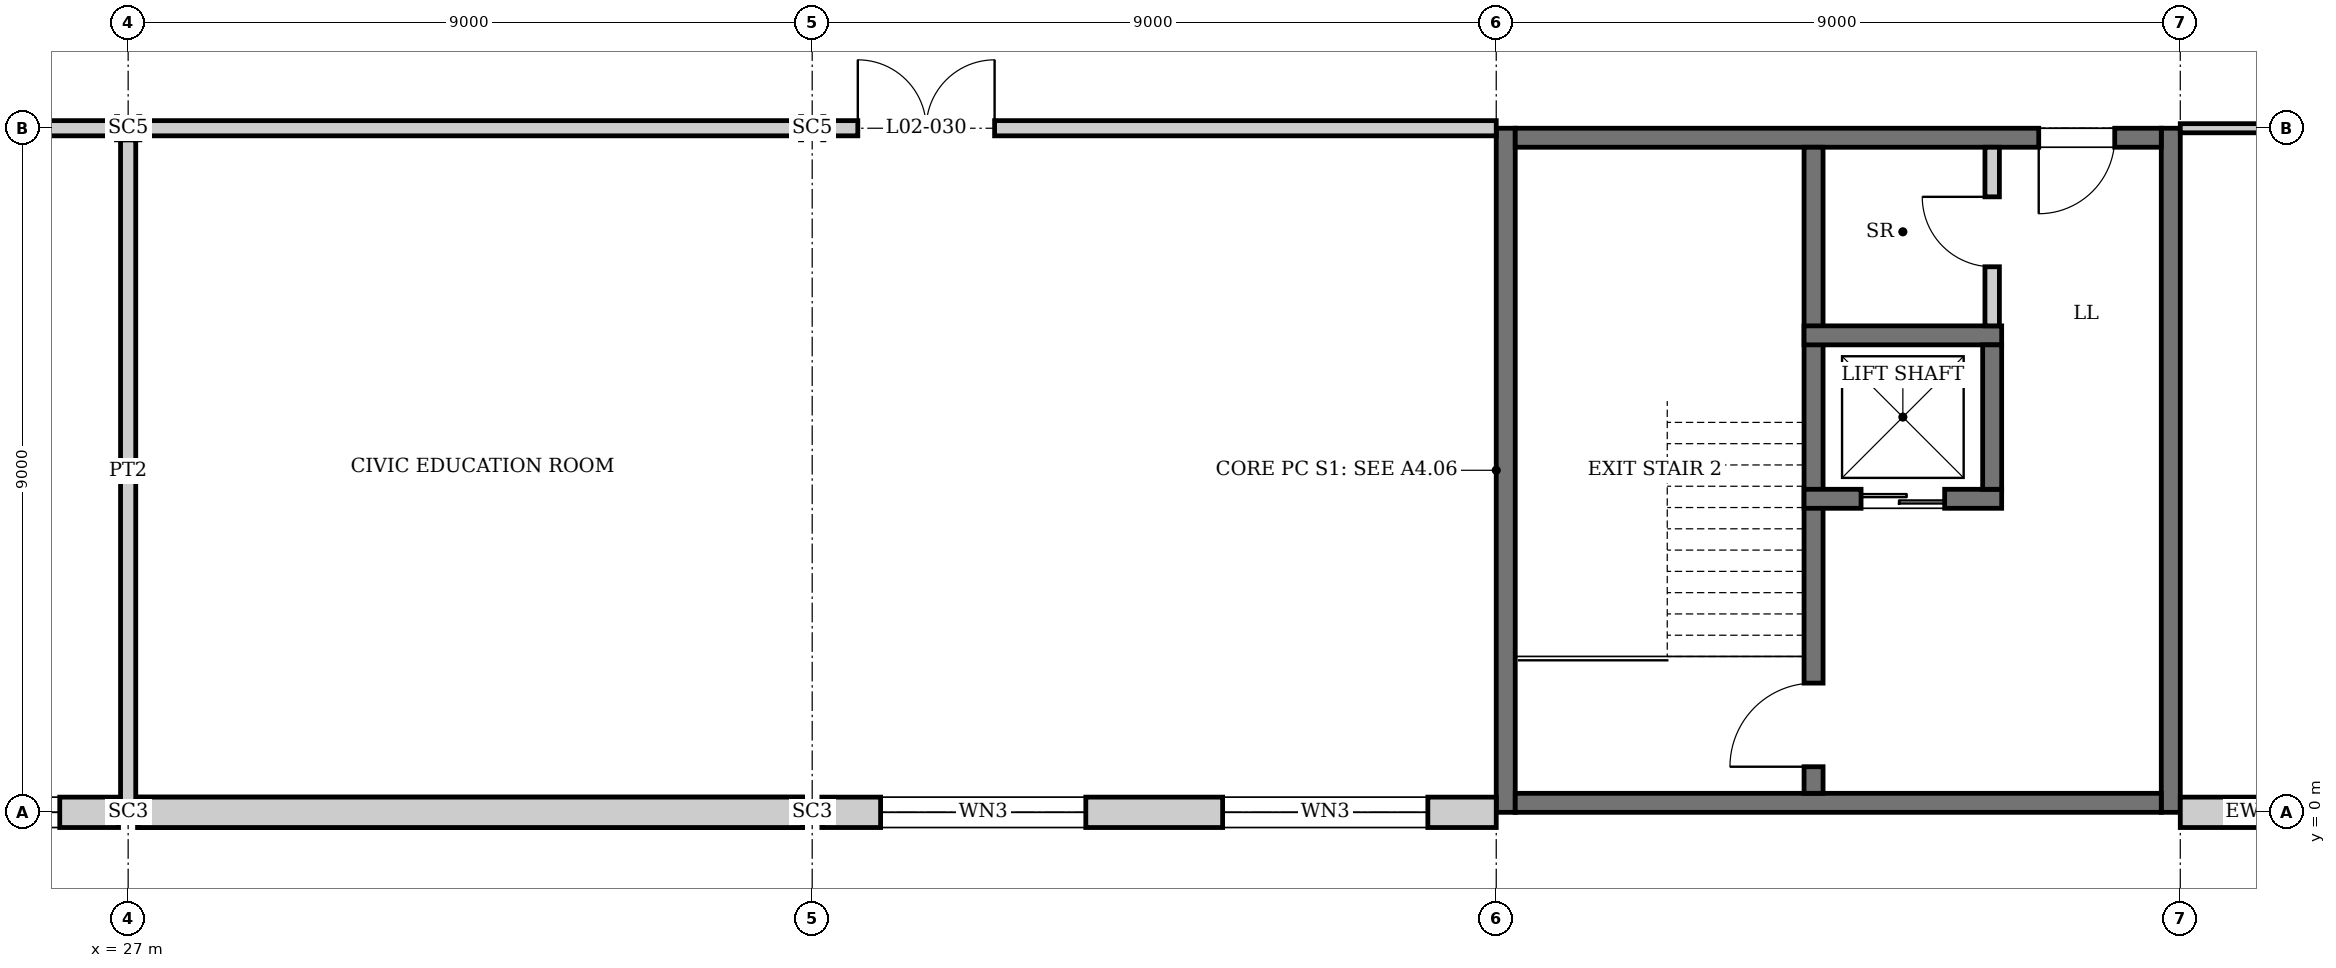
"""IFC4 building model, lengths in metres.
Left out: names, types, materials, properties, quantities, classifications, styles, units other than length and angle.
Written with IfcOpenShell. Run it as: python <this file> out.ifc"""

import sys

from ifc_helpers import new_model, si_unit, direction, frame, frame_2d, origin, origin_2d, place, context, subcontext, project, spatial, polyline, rectangle, i_section, outline, extrude, element, fill, save


model = new_model("IFC4")
c1 = context("Model", 3, precision=1e-05, world=origin(), true_north=direction((0.0, 1.0)))
c2 = subcontext(c1, "Body", "Model", "MODEL_VIEW")
j1 = project(units=[si_unit("LENGTHUNIT", "METRE"), si_unit("PLANEANGLEUNIT", "RADIAN")], contexts=[c1])
p1 = place(None, origin())
s1 = spatial("IfcSite", under=j1, at=p1, CompositionType="ELEMENT")
p2 = place(p1, origin())
s2 = spatial("IfcBuilding", under=s1, at=p2, CompositionType="ELEMENT")
p3 = place(p2, frame((0.0, 0.0, 10.5)))
s3 = spatial("IfcBuildingStorey", under=s2, at=p3, CompositionType="ELEMENT", Elevation=10.5)
p4 = place(p3, frame((27.0, 0.0, 0.0), z_axis=(0.0, 0.0, 1.0), x_axis=(0.0, 1.0, 0.0)))
e1 = element("IfcColumn", 1, at=p4, inside=s3, PredefinedType="COLUMN", context=c2, shape_type="SweptSolid", body=[
    extrude(i_section(OverallWidth=0.254, OverallDepth=0.254, WebThickness=0.009, FlangeThickness=0.014, at=origin_2d()), origin(), (0.0, 0.0, 1.0), 4.5),
])
p5 = place(p3, frame((27.0, 9.0, 0.0), z_axis=(0.0, 0.0, 1.0), x_axis=(0.0, 1.0, 0.0)))
e2 = element("IfcColumn", 2, at=p5, inside=s3, PredefinedType="COLUMN", context=c2, shape_type="SweptSolid", body=[
    extrude(i_section(OverallWidth=0.305, OverallDepth=0.308, WebThickness=0.01, FlangeThickness=0.015, at=origin_2d()), origin(), (0.0, 0.0, 1.0), 4.5),
])
p6 = place(p3, frame((36.0, 0.0, 0.0), z_axis=(0.0, 0.0, 1.0), x_axis=(0.0, 1.0, 0.0)))
e3 = element("IfcColumn", 3, at=p6, inside=s3, PredefinedType="COLUMN", context=c2, shape_type="SweptSolid", body=[
    extrude(i_section(OverallWidth=0.254, OverallDepth=0.254, WebThickness=0.009, FlangeThickness=0.014, at=origin_2d()), origin(), (0.0, 0.0, 1.0), 4.5),
])
p7 = place(p3, frame((36.0, 9.0, 0.0), z_axis=(0.0, 0.0, 1.0), x_axis=(0.0, 1.0, 0.0)))
e4 = element("IfcColumn", 4, at=p7, inside=s3, PredefinedType="COLUMN", context=c2, shape_type="SweptSolid", body=[
    extrude(i_section(OverallWidth=0.305, OverallDepth=0.308, WebThickness=0.01, FlangeThickness=0.015, at=origin_2d()), origin(), (0.0, 0.0, 1.0), 4.5),
])
for number, where, z_axis, x_axis in (
    (5, (45.125, 0.0, 0.0), (0.0, 0.0, 1.0), (0.0, 1.0, 0.0)),
    (6, (53.875, 0.0, 0.0), (0.0, 0.0, 1.0), (0.0, 1.0, 0.0)),
):
    element("IfcWall", number, at=place(p3, frame(where, z_axis=z_axis, x_axis=x_axis)), inside=s3, PredefinedType="SHEAR", context=c2, shape_type="SweptSolid", body=[
        extrude(rectangle(XDim=9.0, YDim=0.25, at=frame_2d((4.5, 0.0))), origin(), (0.0, 0.0, 1.0), 4.35),
    ])
p8 = place(p3, frame((45.25, 0.125, 0.0), z_axis=(0.0, 0.0, 1.0), x_axis=(1.0, 0.0, 0.0)))
e7 = element("IfcWall", 7, at=p8, inside=s3, PredefinedType="SHEAR", context=c2, shape_type="SweptSolid", body=[
    extrude(rectangle(XDim=8.5, YDim=0.25, at=frame_2d((4.25, 0.0))), origin(), (0.0, 0.0, 1.0), 4.35),
])
p9 = place(p3, frame((45.25, 8.875, 0.0), z_axis=(0.0, 0.0, 1.0), x_axis=(1.0, 0.0, 0.0)))
e8 = element("IfcWall", 8, at=p9, inside=s3, PredefinedType="SHEAR", context=c2, shape_type="SweptSolid", body=[
    extrude(rectangle(XDim=8.5, YDim=0.25, at=frame_2d((4.25, 0.0))), origin(), (0.0, 0.0, 1.0), 4.35),
])
p10 = place(p9, frame((6.887, 0.0, 0.0)))
e9 = element("IfcOpeningElement", 9, at=p10, cuts=e8, PredefinedType="OPENING", context=c2, shape_type="SweptSolid", body=[
    extrude(rectangle(XDim=1.0, YDim=2.1, at=frame_2d((0.5, 1.05))), frame((0.0, 0.135, 0.0), z_axis=(0.0, -1.0, 0.0), x_axis=(1.0, 0.0, 0.0)), (0.0, 0.0, 1.0), 0.27),
])
p11 = place(p3, frame((18.0, 0.0, 0.0), z_axis=(0.0, 0.0, 1.0), x_axis=(1.0, 0.0, 0.0)))
e10 = element("IfcWall", 10, at=p11, inside=s3, PredefinedType="SOLIDWALL", context=c2, shape_type="SweptSolid", body=[
    extrude(rectangle(XDim=8.873, YDim=0.4, at=frame_2d((4.437, 0.0))), origin(), (0.0, 0.0, 1.0), 3.991),
])
p12 = place(p11, frame((0.9, 0.0, 1.5)))
e11 = element("IfcOpeningElement", 11, at=p12, cuts=e10, PredefinedType="OPENING", context=c2, shape_type="SweptSolid", body=[
    extrude(rectangle(XDim=2.7, YDim=1.5, at=frame_2d((1.35, 0.75))), frame((0.0, 0.21, 0.0), z_axis=(0.0, -1.0, 0.0), x_axis=(1.0, 0.0, 0.0)), (0.0, 0.0, 1.0), 0.42),
])
p13 = place(p11, frame((5.4, 0.0, 1.5)))
e12 = element("IfcOpeningElement", 12, at=p13, cuts=e10, PredefinedType="OPENING", context=c2, shape_type="SweptSolid", body=[
    extrude(rectangle(XDim=2.7, YDim=1.5, at=frame_2d((1.35, 0.75))), frame((0.0, 0.21, 0.0), z_axis=(0.0, -1.0, 0.0), x_axis=(1.0, 0.0, 0.0)), (0.0, 0.0, 1.0), 0.42),
])
p14 = place(p3, frame((27.127, 0.0, 0.0), z_axis=(0.0, 0.0, 1.0), x_axis=(1.0, 0.0, 0.0)))
e13 = element("IfcWall", 13, at=p14, inside=s3, PredefinedType="SOLIDWALL", context=c2, shape_type="SweptSolid", body=[
    extrude(outline(polyline([(8.746, 0.0), (0.0, 0.0), (0.0, 0.5), (0.048, 0.38), (8.746, 3.86), (8.746, 0.0)])), frame((0.0, 0.2, 0.0), z_axis=(0.0, -1.0, 0.0), x_axis=(1.0, 0.0, 0.0)), (0.0, 0.0, 1.0), 0.4),
])
p15 = place(p3, frame((27.127, 0.0, 0.0), z_axis=(0.0, 0.0, 1.0), x_axis=(1.0, 0.0, 0.0)))
e14 = element("IfcWall", 14, at=p15, inside=s3, PredefinedType="SOLIDWALL", context=c2, shape_type="SweptSolid", body=[
    extrude(outline(polyline([(0.0, 3.991), (8.375, 3.991), (0.0, 0.64), (0.0, 3.991)])), frame((0.0, 0.2, 0.0), z_axis=(0.0, -1.0, 0.0), x_axis=(1.0, 0.0, 0.0)), (0.0, 0.0, 1.0), 0.4),
])
p16 = place(p3, frame((36.127, 0.0, 0.0), z_axis=(0.0, 0.0, 1.0), x_axis=(1.0, 0.0, 0.0)))
e15 = element("IfcWall", 15, at=p16, inside=s3, PredefinedType="SOLIDWALL", context=c2, shape_type="SweptSolid", body=[
    extrude(rectangle(XDim=8.873, YDim=0.4, at=frame_2d((4.437, 0.0))), origin(), (0.0, 0.0, 1.0), 3.991),
])
p17 = place(p16, frame((0.773, 0.0, 1.5)))
e16 = element("IfcOpeningElement", 16, at=p17, cuts=e15, PredefinedType="OPENING", context=c2, shape_type="SweptSolid", body=[
    extrude(rectangle(XDim=2.7, YDim=1.5, at=frame_2d((1.35, 0.75))), frame((0.0, 0.21, 0.0), z_axis=(0.0, -1.0, 0.0), x_axis=(1.0, 0.0, 0.0)), (0.0, 0.0, 1.0), 0.42),
])
p18 = place(p16, frame((5.273, 0.0, 1.5)))
e17 = element("IfcOpeningElement", 17, at=p18, cuts=e15, PredefinedType="OPENING", context=c2, shape_type="SweptSolid", body=[
    extrude(rectangle(XDim=2.7, YDim=1.5, at=frame_2d((1.35, 0.75))), frame((0.0, 0.21, 0.0), z_axis=(0.0, -1.0, 0.0), x_axis=(1.0, 0.0, 0.0)), (0.0, 0.0, 1.0), 0.42),
])
p19 = place(p3, frame((54.0, 0.0, 0.0), z_axis=(0.0, 0.0, 1.0), x_axis=(1.0, 0.0, 0.0)))
e18 = element("IfcWall", 18, at=p19, inside=s3, PredefinedType="SOLIDWALL", context=c2, shape_type="SweptSolid", body=[
    extrude(rectangle(XDim=8.873, YDim=0.4, at=frame_2d((4.437, 0.0))), origin(), (0.0, 0.0, 1.0), 3.991),
])
p20 = place(p19, frame((1.8, 0.0, 1.7)))
e19 = element("IfcOpeningElement", 19, at=p20, cuts=e18, PredefinedType="OPENING", context=c2, shape_type="SweptSolid", body=[
    extrude(rectangle(XDim=0.9, YDim=0.6, at=frame_2d((0.45, 0.3))), frame((0.0, 0.21, 0.0), z_axis=(0.0, -1.0, 0.0), x_axis=(1.0, 0.0, 0.0)), (0.0, 0.0, 1.0), 0.42),
])
p21 = place(p19, frame((6.3, 0.0, 1.7)))
e20 = element("IfcOpeningElement", 20, at=p21, cuts=e18, PredefinedType="OPENING", context=c2, shape_type="SweptSolid", body=[
    extrude(rectangle(XDim=0.9, YDim=0.6, at=frame_2d((0.45, 0.3))), frame((0.0, 0.21, 0.0), z_axis=(0.0, -1.0, 0.0), x_axis=(1.0, 0.0, 0.0)), (0.0, 0.0, 1.0), 0.42),
])
p22 = place(p19, frame((4.05, 0.0, 1.7)))
e21 = element("IfcOpeningElement", 21, at=p22, cuts=e18, PredefinedType="OPENING", context=c2, shape_type="SweptSolid", body=[
    extrude(rectangle(XDim=0.9, YDim=0.6, at=frame_2d((0.45, 0.3))), frame((0.0, 0.21, 0.0), z_axis=(0.0, -1.0, 0.0), x_axis=(1.0, 0.0, 0.0)), (0.0, 0.0, 1.0), 0.42),
])
p23 = place(p3, frame((49.175, 0.25, 0.0), z_axis=(0.0, 0.0, 1.0), x_axis=(0.0, 1.0, 0.0)))
e22 = element("IfcWall", 22, at=p23, inside=s3, PredefinedType="SOLIDWALL", context=c2, shape_type="SweptSolid", body=[
    extrude(rectangle(XDim=8.5, YDim=0.25, at=frame_2d((4.25, 0.0))), origin(), (0.0, 0.0, 1.0), 4.35),
])
p24 = place(p23, frame((0.35, 0.0, 0.0)))
e23 = element("IfcOpeningElement", 23, at=p24, cuts=e22, PredefinedType="OPENING", context=c2, shape_type="SweptSolid", body=[
    extrude(rectangle(XDim=1.1, YDim=2.1, at=frame_2d((0.55, 1.05))), frame((0.0, 0.135, 0.0), z_axis=(0.0, -1.0, 0.0), x_axis=(1.0, 0.0, 0.0)), (0.0, 0.0, 1.0), 0.27),
])
p25 = place(p3, frame((49.05, 4.125, 0.0), z_axis=(0.0, 0.0, 1.0), x_axis=(1.0, 0.0, 0.0)))
e24 = element("IfcWall", 24, at=p25, inside=s3, PredefinedType="SOLIDWALL", context=c2, shape_type="SweptSolid", body=[
    extrude(rectangle(XDim=2.6, YDim=0.25, at=frame_2d((1.3, 0.0))), origin(), (0.0, 0.0, 1.0), 4.35),
])
p26 = place(p25, frame((0.75, 0.0, 0.0)))
e25 = element("IfcOpeningElement", 25, at=p26, cuts=e24, PredefinedType="OPENING", context=c2, shape_type="SweptSolid", body=[
    extrude(rectangle(XDim=1.1, YDim=2.1, at=frame_2d((0.55, 1.05))), frame((0.0, 0.135, 0.0), z_axis=(0.0, -1.0, 0.0), x_axis=(1.0, 0.0, 0.0)), (0.0, 0.0, 1.0), 0.27),
])
p27 = place(p3, frame((49.05, 6.275, 0.0), z_axis=(0.0, 0.0, 1.0), x_axis=(1.0, 0.0, 0.0)))
e26 = element("IfcWall", 26, at=p27, inside=s3, PredefinedType="SOLIDWALL", context=c2, shape_type="SweptSolid", body=[
    extrude(rectangle(XDim=2.6, YDim=0.25, at=frame_2d((1.3, 0.0))), origin(), (0.0, 0.0, 1.0), 4.35),
])
p28 = place(p3, frame((51.525, 4.25, 0.0), z_axis=(0.0, 0.0, 1.0), x_axis=(0.0, 1.0, 0.0)))
e27 = element("IfcWall", 27, at=p28, inside=s3, PredefinedType="SOLIDWALL", context=c2, shape_type="SweptSolid", body=[
    extrude(rectangle(XDim=1.9, YDim=0.25, at=frame_2d((0.95, 0.0))), origin(), (0.0, 0.0, 1.0), 4.35),
])
p29 = place(p3, frame((18.0, 9.0, 0.0), z_axis=(0.0, 0.0, 1.0), x_axis=(1.0, 0.0, 0.0)))
e28 = element("IfcWall", 28, at=p29, inside=s3, PredefinedType="PARTITIONING", context=c2, shape_type="SweptSolid", body=[
    extrude(rectangle(XDim=8.846, YDim=0.2, at=frame_2d((4.423, 0.0))), origin(), (0.0, 0.0, 1.0), 2.414),
])
p30 = place(p29, frame((3.9, 0.0, 0.0)))
e29 = element("IfcOpeningElement", 29, at=p30, cuts=e28, PredefinedType="OPENING", context=c2, shape_type="SweptSolid", body=[
    extrude(rectangle(XDim=1.2, YDim=2.1, at=frame_2d((0.6, 1.05))), frame((0.0, 0.11, 0.0), z_axis=(0.0, -1.0, 0.0), x_axis=(1.0, 0.0, 0.0)), (0.0, 0.0, 1.0), 0.22),
])
p31 = place(p3, frame((27.154, 9.0, 0.0), z_axis=(0.0, 0.0, 1.0), x_axis=(1.0, 0.0, 0.0)))
e30 = element("IfcWall", 30, at=p31, inside=s3, PredefinedType="PARTITIONING", context=c2, shape_type="SweptSolid", body=[
    extrude(rectangle(XDim=8.692, YDim=0.2, at=frame_2d((4.346, 0.0))), origin(), (0.0, 0.0, 1.0), 2.414),
])
p32 = place(p3, frame((36.154, 9.0, 0.0), z_axis=(0.0, 0.0, 1.0), x_axis=(1.0, 0.0, 0.0)))
e31 = element("IfcWall", 31, at=p32, inside=s3, PredefinedType="PARTITIONING", context=c2, shape_type="SweptSolid", body=[
    extrude(rectangle(XDim=8.846, YDim=0.2, at=frame_2d((4.423, 0.0))), origin(), (0.0, 0.0, 1.0), 2.414),
])
p33 = place(p32, frame((0.446, 0.0, 0.0)))
e32 = element("IfcOpeningElement", 32, at=p33, cuts=e31, PredefinedType="OPENING", context=c2, shape_type="SweptSolid", body=[
    extrude(rectangle(XDim=1.8, YDim=2.1, at=frame_2d((0.9, 1.05))), frame((0.0, 0.11, 0.0), z_axis=(0.0, -1.0, 0.0), x_axis=(1.0, 0.0, 0.0)), (0.0, 0.0, 1.0), 0.22),
])
p34 = place(p3, frame((54.0, 9.0, 0.0), z_axis=(0.0, 0.0, 1.0), x_axis=(1.0, 0.0, 0.0)))
e33 = element("IfcWall", 33, at=p34, inside=s3, PredefinedType="PARTITIONING", context=c2, shape_type="SweptSolid", body=[
    extrude(rectangle(XDim=8.846, YDim=0.12, at=frame_2d((4.423, 0.0))), origin(), (0.0, 0.0, 1.0), 2.414),
])
p35 = place(p34, frame((3.6, 0.0, 0.0)))
e34 = element("IfcOpeningElement", 34, at=p35, cuts=e33, PredefinedType="OPENING", context=c2, shape_type="SweptSolid", body=[
    extrude(rectangle(XDim=1.8, YDim=2.1, at=frame_2d((0.9, 1.05))), frame((0.0, 0.07, 0.0), z_axis=(0.0, -1.0, 0.0), x_axis=(1.0, 0.0, 0.0)), (0.0, 0.0, 1.0), 0.14),
])
p36 = place(p3, frame((27.0, 0.127, 0.0), z_axis=(0.0, 0.0, 1.0), x_axis=(0.0, 1.0, 0.0)))
e35 = element("IfcWall", 35, at=p36, inside=s3, PredefinedType="PARTITIONING", context=c2, shape_type="SweptSolid", body=[
    extrude(rectangle(XDim=8.719, YDim=0.2, at=frame_2d((4.359, 0.0))), origin(), (0.0, 0.0, 1.0), 3.998),
])
p37 = place(p3, frame((51.525, 6.4, 0.0), z_axis=(0.0, 0.0, 1.0), x_axis=(0.0, 1.0, 0.0)))
e36 = element("IfcWall", 36, at=p37, inside=s3, PredefinedType="PARTITIONING", context=c2, shape_type="SweptSolid", body=[
    extrude(rectangle(XDim=2.35, YDim=0.19, at=frame_2d((1.175, 0.0))), origin(), (0.0, 0.0, 1.0), 4.35),
])
p38 = place(p37, frame((0.778, 0.0, 0.0)))
e37 = element("IfcOpeningElement", 37, at=p38, cuts=e36, PredefinedType="OPENING", context=c2, shape_type="SweptSolid", body=[
    extrude(rectangle(XDim=0.92, YDim=2.1, at=frame_2d((0.46, 1.05))), frame((0.0, 0.105, 0.0), z_axis=(0.0, -1.0, 0.0), x_axis=(1.0, 0.0, 0.0)), (0.0, 0.0, 1.0), 0.21),
])
p39 = place(p13, origin())
e38 = element("IfcWindow", 38, at=p39, inside=s3, PartitioningType="SINGLE_PANEL", PredefinedType="WINDOW", context=c2, shape_type="SweptSolid", body=[
    extrude(rectangle(XDim=2.7, YDim=1.5, at=frame_2d((1.35, 0.75))), frame((0.0, 0.03, 0.0), z_axis=(0.0, -1.0, 0.0), x_axis=(1.0, 0.0, 0.0)), (0.0, 0.0, 1.0), 0.06),
])
fill(e12, e38)
p40 = place(p17, origin())
e39 = element("IfcWindow", 39, at=p40, inside=s3, PartitioningType="SINGLE_PANEL", PredefinedType="WINDOW", context=c2, shape_type="SweptSolid", body=[
    extrude(rectangle(XDim=2.7, YDim=1.5, at=frame_2d((1.35, 0.75))), frame((0.0, 0.03, 0.0), z_axis=(0.0, -1.0, 0.0), x_axis=(1.0, 0.0, 0.0)), (0.0, 0.0, 1.0), 0.06),
])
fill(e16, e39)
p41 = place(p18, origin())
e40 = element("IfcWindow", 40, at=p41, inside=s3, PartitioningType="SINGLE_PANEL", PredefinedType="WINDOW", context=c2, shape_type="SweptSolid", body=[
    extrude(rectangle(XDim=2.7, YDim=1.5, at=frame_2d((1.35, 0.75))), frame((0.0, 0.03, 0.0), z_axis=(0.0, -1.0, 0.0), x_axis=(1.0, 0.0, 0.0)), (0.0, 0.0, 1.0), 0.06),
])
fill(e17, e40)
p42 = place(p26, origin())
e41 = element("IfcDoor", 41, at=p42, inside=s3, OperationType="DOUBLE_DOOR_SLIDING", PredefinedType="DOOR", context=c2, shape_type="SweptSolid", body=[
    extrude(rectangle(XDim=1.1, YDim=2.1, at=frame_2d((0.55, 1.05))), frame((0.0, 0.025, 0.0), z_axis=(0.0, -1.0, 0.0), x_axis=(1.0, 0.0, 0.0)), (0.0, 0.0, 1.0), 0.05),
])
fill(e25, e41)
p43 = place(p24, origin())
e42 = element("IfcDoor", 42, at=p43, inside=s3, OperationType="SINGLE_SWING_LEFT", PredefinedType="DOOR", context=c2, shape_type="SweptSolid", body=[
    extrude(rectangle(XDim=1.1, YDim=2.1, at=frame_2d((0.55, 1.05))), frame((0.0, 0.025, 0.0), z_axis=(0.0, -1.0, 0.0), x_axis=(1.0, 0.0, 0.0)), (0.0, 0.0, 1.0), 0.05),
])
fill(e23, e42)
p44 = place(p10, frame((1.0, 0.0, 0.0), z_axis=(0.0, 0.0, 1.0), x_axis=(-1.0, 0.0, 0.0)))
e43 = element("IfcDoor", 43, at=p44, inside=s3, OperationType="SINGLE_SWING_RIGHT", PredefinedType="DOOR", context=c2, shape_type="SweptSolid", body=[
    extrude(rectangle(XDim=1.0, YDim=2.1, at=frame_2d((0.5, 1.05))), frame((0.0, 0.025, 0.0), z_axis=(0.0, -1.0, 0.0), x_axis=(1.0, 0.0, 0.0)), (0.0, 0.0, 1.0), 0.05),
])
fill(e9, e43)
p45 = place(p38, origin())
e44 = element("IfcDoor", 44, at=p45, inside=s3, OperationType="SINGLE_SWING_RIGHT", PredefinedType="DOOR", context=c2, shape_type="SweptSolid", body=[
    extrude(rectangle(XDim=0.92, YDim=2.1, at=frame_2d((0.46, 1.05))), frame((0.0, 0.025, 0.0), z_axis=(0.0, -1.0, 0.0), x_axis=(1.0, 0.0, 0.0)), (0.0, 0.0, 1.0), 0.05),
])
fill(e37, e44)
p46 = place(p33, origin())
e45 = element("IfcDoor", 45, at=p46, inside=s3, OperationType="DOUBLE_DOOR_SINGLE_SWING", PredefinedType="DOOR", context=c2, shape_type="SweptSolid", body=[
    extrude(rectangle(XDim=1.8, YDim=2.1, at=frame_2d((0.9, 1.05))), frame((0.0, 0.025, 0.0), z_axis=(0.0, -1.0, 0.0), x_axis=(1.0, 0.0, 0.0)), (0.0, 0.0, 1.0), 0.05),
])
fill(e32, e45)
save(model, sys.argv[1])
